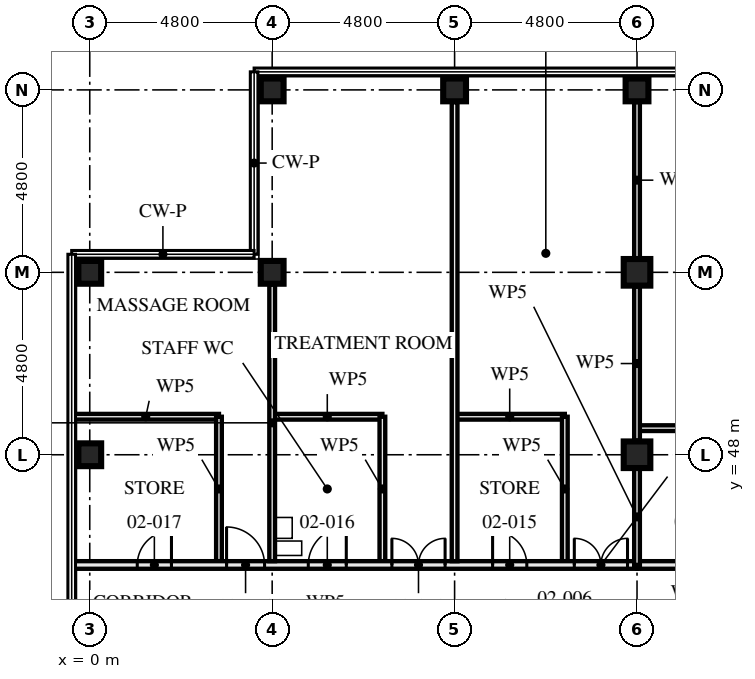
"""IFC4 building model, lengths in metres.
Left out: names, types, materials, properties, quantities, classifications, styles, units other than length and angle.
Written with IfcOpenShell. Run it as: python <this file> out.ifc"""

import sys

from ifc_helpers import new_model, si_unit, direction, frame, frame_2d, origin, origin_2d, place, context, subcontext, project, spatial, rectangle, hollow_rectangle, extrude, element, fill, save


model = new_model("IFC4")
c1 = context("Model", 3, precision=1e-05, world=origin(), true_north=direction((0.0, 1.0)))
c2 = subcontext(c1, "Body", "Model", "MODEL_VIEW")
j1 = project(units=[si_unit("LENGTHUNIT", "METRE"), si_unit("PLANEANGLEUNIT", "RADIAN")], contexts=[c1])
p1 = place(None, origin())
s1 = spatial("IfcSite", under=j1, at=p1, CompositionType="ELEMENT")
p2 = place(p1, origin())
s2 = spatial("IfcBuilding", under=s1, at=p2, CompositionType="ELEMENT")
p3 = place(p2, frame((0.0, 0.0, 9.0)))
s3 = spatial("IfcBuildingStorey", under=s2, at=p3, CompositionType="ELEMENT", Elevation=9.0)
for number, where, z_axis, x_axis in (
    (1, (0.0, 48.0, 0.0), (0.0, 0.0, 1.0), (1.0, 0.0, 0.0)),
    (2, (0.0, 52.8, 0.0), (0.0, 0.0, 1.0), (0.0, 1.0, 0.0)),
    (3, (4.8, 52.8, 0.0), (0.0, 0.0, 1.0), (0.0, 1.0, 0.0)),
    (4, (4.8, 57.6, 0.0), (0.0, 0.0, 1.0), (0.0, 1.0, 0.0)),
    (5, (9.6, 57.6, 0.0), (0.0, 0.0, 1.0), (0.0, 1.0, 0.0)),
):
    element("IfcColumn", number, at=place(p3, frame(where, z_axis=z_axis, x_axis=x_axis)), inside=s3, PredefinedType="COLUMN", context=c2, shape_type="SweptSolid", body=[
        extrude(hollow_rectangle(XDim=0.6, YDim=0.6, WallThickness=0.08, at=origin_2d()), origin(), (0.0, 0.0, 1.0), 4.5),
    ])
for number, where, z_axis, x_axis in (
    (6, (14.4, 48.0, 0.0), (0.0, 0.0, 1.0), (1.0, 0.0, 0.0)),
    (7, (14.4, 52.8, 0.0), (0.0, 0.0, 1.0), (1.0, 0.0, 0.0)),
):
    element("IfcColumn", number, at=place(p3, frame(where, z_axis=z_axis, x_axis=x_axis)), inside=s3, PredefinedType="COLUMN", context=c2, shape_type="SweptSolid", body=[
        extrude(hollow_rectangle(XDim=0.7, YDim=0.7, WallThickness=0.06, at=origin_2d()), origin(), (0.0, 0.0, 1.0), 4.5),
    ])
p4 = place(p3, frame((14.4, 57.6, 0.0), z_axis=(0.0, 0.0, 1.0), x_axis=(0.0, 1.0, 0.0)))
e8 = element("IfcColumn", 8, at=p4, inside=s3, PredefinedType="COLUMN", context=c2, shape_type="SweptSolid", body=[
    extrude(hollow_rectangle(XDim=0.6, YDim=0.6, WallThickness=0.08, at=origin_2d()), origin(), (0.0, 0.0, 1.0), 4.5),
])
p5 = place(p3, frame((12.5, 49.0, 0.0), z_axis=(0.0, 0.0, 1.0), x_axis=(0.0, -1.0, 0.0)))
e9 = element("IfcWall", 9, at=p5, inside=s3, PredefinedType="PARTITIONING", context=c2, shape_type="SweptSolid", body=[
    extrude(rectangle(XDim=3.8, YDim=0.15, at=frame_2d((1.9, 0.0))), origin(), (0.0, 0.0, 1.0), 3.55),
])
p6 = place(p3, frame((12.5, 49.0, 0.0), z_axis=(0.0, 0.0, 1.0), x_axis=(-1.0, 0.0, 0.0)))
e10 = element("IfcWall", 10, at=p6, inside=s3, PredefinedType="PARTITIONING", context=c2, shape_type="SweptSolid", body=[
    extrude(rectangle(XDim=2.9, YDim=0.15, at=frame_2d((1.45, 0.0))), origin(), (0.0, 0.0, 1.0), 4.33),
])
p7 = place(p3, frame((7.7, 49.0, 0.0), z_axis=(0.0, 0.0, 1.0), x_axis=(0.0, -1.0, 0.0)))
e11 = element("IfcWall", 11, at=p7, inside=s3, PredefinedType="PARTITIONING", context=c2, shape_type="SweptSolid", body=[
    extrude(rectangle(XDim=3.8, YDim=0.15, at=frame_2d((1.9, 0.0))), origin(), (0.0, 0.0, 1.0), 3.55),
])
p8 = place(p3, frame((7.7, 49.0, 0.0), z_axis=(0.0, 0.0, 1.0), x_axis=(-1.0, 0.0, 0.0)))
e12 = element("IfcWall", 12, at=p8, inside=s3, PredefinedType="PARTITIONING", context=c2, shape_type="SweptSolid", body=[
    extrude(rectangle(XDim=2.9, YDim=0.15, at=frame_2d((1.45, 0.0))), origin(), (0.0, 0.0, 1.0), 4.33),
])
p9 = place(p3, frame((3.4, 49.0, 0.0), z_axis=(0.0, 0.0, 1.0), x_axis=(0.0, -1.0, 0.0)))
e13 = element("IfcWall", 13, at=p9, inside=s3, PredefinedType="PARTITIONING", context=c2, shape_type="SweptSolid", body=[
    extrude(rectangle(XDim=3.8, YDim=0.15, at=frame_2d((1.9, 0.0))), origin(), (0.0, 0.0, 1.0), 3.55),
])
p10 = place(p3, frame((3.4, 49.0, 0.0), z_axis=(0.0, 0.0, 1.0), x_axis=(-1.0, 0.0, 0.0)))
e14 = element("IfcWall", 14, at=p10, inside=s3, PredefinedType="PARTITIONING", context=c2, shape_type="SweptSolid", body=[
    extrude(rectangle(XDim=3.855, YDim=0.15, at=frame_2d((1.927, 0.0))), origin(), (0.0, 0.0, 1.0), 3.32),
])
p11 = place(p3, frame((9.6, 57.28, 0.0), z_axis=(0.0, 0.0, 1.0), x_axis=(0.0, -1.0, 0.0)))
e15 = element("IfcWall", 15, at=p11, inside=s3, PredefinedType="PARTITIONING", context=c2, shape_type="SweptSolid", body=[
    extrude(rectangle(XDim=12.08, YDim=0.15, at=frame_2d((6.04, 0.0))), origin(), (0.0, 0.0, 1.0), 3.55),
])
p12 = place(p3, frame((4.8, 52.48, 0.0), z_axis=(0.0, 0.0, 1.0), x_axis=(0.0, -1.0, 0.0)))
e16 = element("IfcWall", 16, at=p12, inside=s3, PredefinedType="PARTITIONING", context=c2, shape_type="SweptSolid", body=[
    extrude(rectangle(XDim=7.28, YDim=0.15, at=frame_2d((3.64, 0.0))), origin(), (0.0, 0.0, 1.0), 3.55),
])
p13 = place(p3, frame((14.4, 45.1, 0.0), z_axis=(0.0, 0.0, 1.0), x_axis=(-1.0, 0.0, 0.0)))
e17 = element("IfcWall", 17, at=p13, inside=s3, PredefinedType="PARTITIONING", context=c2, shape_type="SweptSolid", body=[
    extrude(rectangle(XDim=14.855, YDim=0.2, at=frame_2d((7.427, 0.0))), origin(), (0.0, 0.0, 1.0), 3.32),
])
p14 = place(p13, frame((0.25, 0.0, 0.0)))
e18 = element("IfcOpeningElement", 18, at=p14, cuts=e17, PredefinedType="OPENING", context=c2, shape_type="SweptSolid", body=[
    extrude(rectangle(XDim=1.4, YDim=2.4, at=frame_2d((0.7, 1.2))), frame((0.0, 0.111, 0.0), z_axis=(0.0, -1.0, 0.0), x_axis=(1.0, 0.0, 0.0)), (0.0, 0.0, 1.0), 0.221),
])
p15 = place(p13, frame((5.05, 0.0, 0.0)))
e19 = element("IfcOpeningElement", 19, at=p15, cuts=e17, PredefinedType="OPENING", context=c2, shape_type="SweptSolid", body=[
    extrude(rectangle(XDim=1.4, YDim=2.4, at=frame_2d((0.7, 1.2))), frame((0.0, 0.111, 0.0), z_axis=(0.0, -1.0, 0.0), x_axis=(1.0, 0.0, 0.0)), (0.0, 0.0, 1.0), 0.221),
])
p16 = place(p13, frame((9.8, 0.0, 0.0)))
e20 = element("IfcOpeningElement", 20, at=p16, cuts=e17, PredefinedType="OPENING", context=c2, shape_type="SweptSolid", body=[
    extrude(rectangle(XDim=1.0, YDim=2.4, at=frame_2d((0.5, 1.2))), frame((0.0, 0.111, 0.0), z_axis=(0.0, -1.0, 0.0), x_axis=(1.0, 0.0, 0.0)), (0.0, 0.0, 1.0), 0.221),
])
p17 = place(p13, frame((2.9, 0.0, 0.0)))
e21 = element("IfcOpeningElement", 21, at=p17, cuts=e17, PredefinedType="OPENING", context=c2, shape_type="SweptSolid", body=[
    extrude(rectangle(XDim=0.9, YDim=2.1, at=frame_2d((0.45, 1.05))), frame((0.0, 0.111, 0.0), z_axis=(0.0, -1.0, 0.0), x_axis=(1.0, 0.0, 0.0)), (0.0, 0.0, 1.0), 0.221),
])
p18 = place(p13, frame((7.65, 0.0, 0.0)))
e22 = element("IfcOpeningElement", 22, at=p18, cuts=e17, PredefinedType="OPENING", context=c2, shape_type="SweptSolid", body=[
    extrude(rectangle(XDim=1.0, YDim=2.1, at=frame_2d((0.5, 1.05))), frame((0.0, 0.111, 0.0), z_axis=(0.0, -1.0, 0.0), x_axis=(1.0, 0.0, 0.0)), (0.0, 0.0, 1.0), 0.221),
])
p19 = place(p13, frame((12.25, 0.0, 0.0)))
e23 = element("IfcOpeningElement", 23, at=p19, cuts=e17, PredefinedType="OPENING", context=c2, shape_type="SweptSolid", body=[
    extrude(rectangle(XDim=0.9, YDim=2.1, at=frame_2d((0.45, 1.05))), frame((0.0, 0.111, 0.0), z_axis=(0.0, -1.0, 0.0), x_axis=(1.0, 0.0, 0.0)), (0.0, 0.0, 1.0), 0.221),
])
p20 = place(p3, frame((17.8, 48.7, 0.0), z_axis=(0.0, 0.0, 1.0), x_axis=(-1.0, 0.0, 0.0)))
e24 = element("IfcWall", 24, at=p20, inside=s3, PredefinedType="PARTITIONING", context=c2, shape_type="SweptSolid", body=[
    extrude(rectangle(XDim=3.4, YDim=0.15, at=frame_2d((1.7, 0.0))), origin(), (0.0, 0.0, 1.0), 4.33),
])
p21 = place(p3, frame((28.8, 45.1, 0.0), z_axis=(0.0, 0.0, 1.0), x_axis=(-1.0, 0.0, 0.0)))
e25 = element("IfcWall", 25, at=p21, inside=s3, PredefinedType="PARTITIONING", context=c2, shape_type="SweptSolid", body=[
    extrude(rectangle(XDim=14.4, YDim=0.2, at=frame_2d((7.2, 0.0))), origin(), (0.0, 0.0, 1.0), 4.33),
])
p22 = place(p21, frame((0.2, 0.0, 0.0)))
e26 = element("IfcOpeningElement", 26, at=p22, cuts=e25, PredefinedType="OPENING", context=c2, shape_type="SweptSolid", body=[
    extrude(rectangle(XDim=1.0, YDim=2.4, at=frame_2d((0.5, 1.2))), frame((0.0, 0.111, 0.0), z_axis=(0.0, -1.0, 0.0), x_axis=(1.0, 0.0, 0.0)), (0.0, 0.0, 1.0), 0.221),
])
p23 = place(p21, frame((5.0, 0.0, 0.0)))
e27 = element("IfcOpeningElement", 27, at=p23, cuts=e25, PredefinedType="OPENING", context=c2, shape_type="SweptSolid", body=[
    extrude(rectangle(XDim=1.0, YDim=2.4, at=frame_2d((0.5, 1.2))), frame((0.0, 0.111, 0.0), z_axis=(0.0, -1.0, 0.0), x_axis=(1.0, 0.0, 0.0)), (0.0, 0.0, 1.0), 0.221),
])
p24 = place(p21, frame((9.8, 0.0, 0.0)))
e28 = element("IfcOpeningElement", 28, at=p24, cuts=e25, PredefinedType="OPENING", context=c2, shape_type="SweptSolid", body=[
    extrude(rectangle(XDim=1.0, YDim=2.4, at=frame_2d((0.5, 1.2))), frame((0.0, 0.111, 0.0), z_axis=(0.0, -1.0, 0.0), x_axis=(1.0, 0.0, 0.0)), (0.0, 0.0, 1.0), 0.221),
])
p25 = place(p21, frame((2.65, 0.0, 0.0)))
e29 = element("IfcOpeningElement", 29, at=p25, cuts=e25, PredefinedType="OPENING", context=c2, shape_type="SweptSolid", body=[
    extrude(rectangle(XDim=0.9, YDim=2.1, at=frame_2d((0.45, 1.05))), frame((0.0, 0.111, 0.0), z_axis=(0.0, -1.0, 0.0), x_axis=(1.0, 0.0, 0.0)), (0.0, 0.0, 1.0), 0.221),
])
p26 = place(p21, frame((7.45, 0.0, 0.0)))
e30 = element("IfcOpeningElement", 30, at=p26, cuts=e25, PredefinedType="OPENING", context=c2, shape_type="SweptSolid", body=[
    extrude(rectangle(XDim=0.9, YDim=2.1, at=frame_2d((0.45, 1.05))), frame((0.0, 0.111, 0.0), z_axis=(0.0, -1.0, 0.0), x_axis=(1.0, 0.0, 0.0)), (0.0, 0.0, 1.0), 0.221),
])
p27 = place(p21, frame((12.25, 0.0, 0.0)))
e31 = element("IfcOpeningElement", 31, at=p27, cuts=e25, PredefinedType="OPENING", context=c2, shape_type="SweptSolid", body=[
    extrude(rectangle(XDim=0.9, YDim=2.1, at=frame_2d((0.45, 1.05))), frame((0.0, 0.111, 0.0), z_axis=(0.0, -1.0, 0.0), x_axis=(1.0, 0.0, 0.0)), (0.0, 0.0, 1.0), 0.221),
])
p28 = place(p3, frame((14.4, 45.1, 0.0), z_axis=(0.0, 0.0, 1.0), x_axis=(0.0, 1.0, 0.0)))
e32 = element("IfcWall", 32, at=p28, inside=s3, PredefinedType="PARTITIONING", context=c2, shape_type="SweptSolid", body=[
    extrude(rectangle(XDim=2.53, YDim=0.15, at=frame_2d((1.265, 0.0))), origin(), (0.0, 0.0, 1.0), 3.32),
])
p29 = place(p3, frame((14.4, 48.37, 0.0), z_axis=(0.0, 0.0, 1.0), x_axis=(0.0, 1.0, 0.0)))
e33 = element("IfcWall", 33, at=p29, inside=s3, PredefinedType="PARTITIONING", context=c2, shape_type="SweptSolid", body=[
    extrude(rectangle(XDim=4.06, YDim=0.15, at=frame_2d((2.03, 0.0))), origin(), (0.0, 0.0, 1.0), 3.32),
])
p30 = place(p3, frame((14.4, 53.17, 0.0), z_axis=(0.0, 0.0, 1.0), x_axis=(0.0, 1.0, 0.0)))
e34 = element("IfcWall", 34, at=p30, inside=s3, PredefinedType="PARTITIONING", context=c2, shape_type="SweptSolid", body=[
    extrude(rectangle(XDim=4.11, YDim=0.15, at=frame_2d((2.055, 0.0))), origin(), (0.0, 0.0, 1.0), 3.32),
])
p31 = place(p14, frame((1.4, 0.0, 0.0), z_axis=(0.0, 0.0, 1.0), x_axis=(-1.0, 0.0, 0.0)))
e35 = element("IfcDoor", 35, at=p31, inside=s3, OperationType="DOUBLE_DOOR_SINGLE_SWING", PredefinedType="DOOR", context=c2, shape_type="SweptSolid", body=[
    extrude(rectangle(XDim=1.4, YDim=2.4, at=frame_2d((0.7, 1.2))), frame((0.0, 0.027, 0.0), z_axis=(0.0, -1.0, 0.0), x_axis=(1.0, 0.0, 0.0)), (0.0, 0.0, 1.0), 0.054),
])
fill(e18, e35)
p32 = place(p15, frame((1.4, 0.0, 0.0), z_axis=(0.0, 0.0, 1.0), x_axis=(-1.0, 0.0, 0.0)))
e36 = element("IfcDoor", 36, at=p32, inside=s3, OperationType="DOUBLE_DOOR_SINGLE_SWING", PredefinedType="DOOR", context=c2, shape_type="SweptSolid", body=[
    extrude(rectangle(XDim=1.4, YDim=2.4, at=frame_2d((0.7, 1.2))), frame((0.0, 0.027, 0.0), z_axis=(0.0, -1.0, 0.0), x_axis=(1.0, 0.0, 0.0)), (0.0, 0.0, 1.0), 0.054),
])
fill(e19, e36)
p33 = place(p16, frame((1.0, 0.0, 0.0), z_axis=(0.0, 0.0, 1.0), x_axis=(-1.0, 0.0, 0.0)))
e37 = element("IfcDoor", 37, at=p33, inside=s3, OperationType="SINGLE_SWING_RIGHT", PredefinedType="DOOR", context=c2, shape_type="SweptSolid", body=[
    extrude(rectangle(XDim=1.0, YDim=2.4, at=frame_2d((0.5, 1.2))), frame((0.0, 0.027, 0.0), z_axis=(0.0, -1.0, 0.0), x_axis=(1.0, 0.0, 0.0)), (0.0, 0.0, 1.0), 0.054),
])
fill(e20, e37)
p34 = place(p17, frame((0.9, 0.0, 0.0), z_axis=(0.0, 0.0, 1.0), x_axis=(-1.0, 0.0, 0.0)))
e38 = element("IfcDoor", 38, at=p34, inside=s3, OperationType="SINGLE_SWING_RIGHT", PredefinedType="DOOR", context=c2, shape_type="SweptSolid", body=[
    extrude(rectangle(XDim=0.9, YDim=2.1, at=frame_2d((0.45, 1.05))), frame((0.0, 0.027, 0.0), z_axis=(0.0, -1.0, 0.0), x_axis=(1.0, 0.0, 0.0)), (0.0, 0.0, 1.0), 0.054),
])
fill(e21, e38)
p35 = place(p18, frame((1.0, 0.0, 0.0), z_axis=(0.0, 0.0, 1.0), x_axis=(-1.0, 0.0, 0.0)))
e39 = element("IfcDoor", 39, at=p35, inside=s3, OperationType="SINGLE_SWING_LEFT", PredefinedType="DOOR", context=c2, shape_type="SweptSolid", body=[
    extrude(rectangle(XDim=1.0, YDim=2.1, at=frame_2d((0.5, 1.05))), frame((0.0, 0.027, 0.0), z_axis=(0.0, -1.0, 0.0), x_axis=(1.0, 0.0, 0.0)), (0.0, 0.0, 1.0), 0.054),
])
fill(e22, e39)
p36 = place(p19, frame((0.9, 0.0, 0.0), z_axis=(0.0, 0.0, 1.0), x_axis=(-1.0, 0.0, 0.0)))
e40 = element("IfcDoor", 40, at=p36, inside=s3, OperationType="SINGLE_SWING_LEFT", PredefinedType="DOOR", context=c2, shape_type="SweptSolid", body=[
    extrude(rectangle(XDim=0.9, YDim=2.1, at=frame_2d((0.45, 1.05))), frame((0.0, 0.027, 0.0), z_axis=(0.0, -1.0, 0.0), x_axis=(1.0, 0.0, 0.0)), (0.0, 0.0, 1.0), 0.054),
])
fill(e23, e40)
save(model, sys.argv[1])
